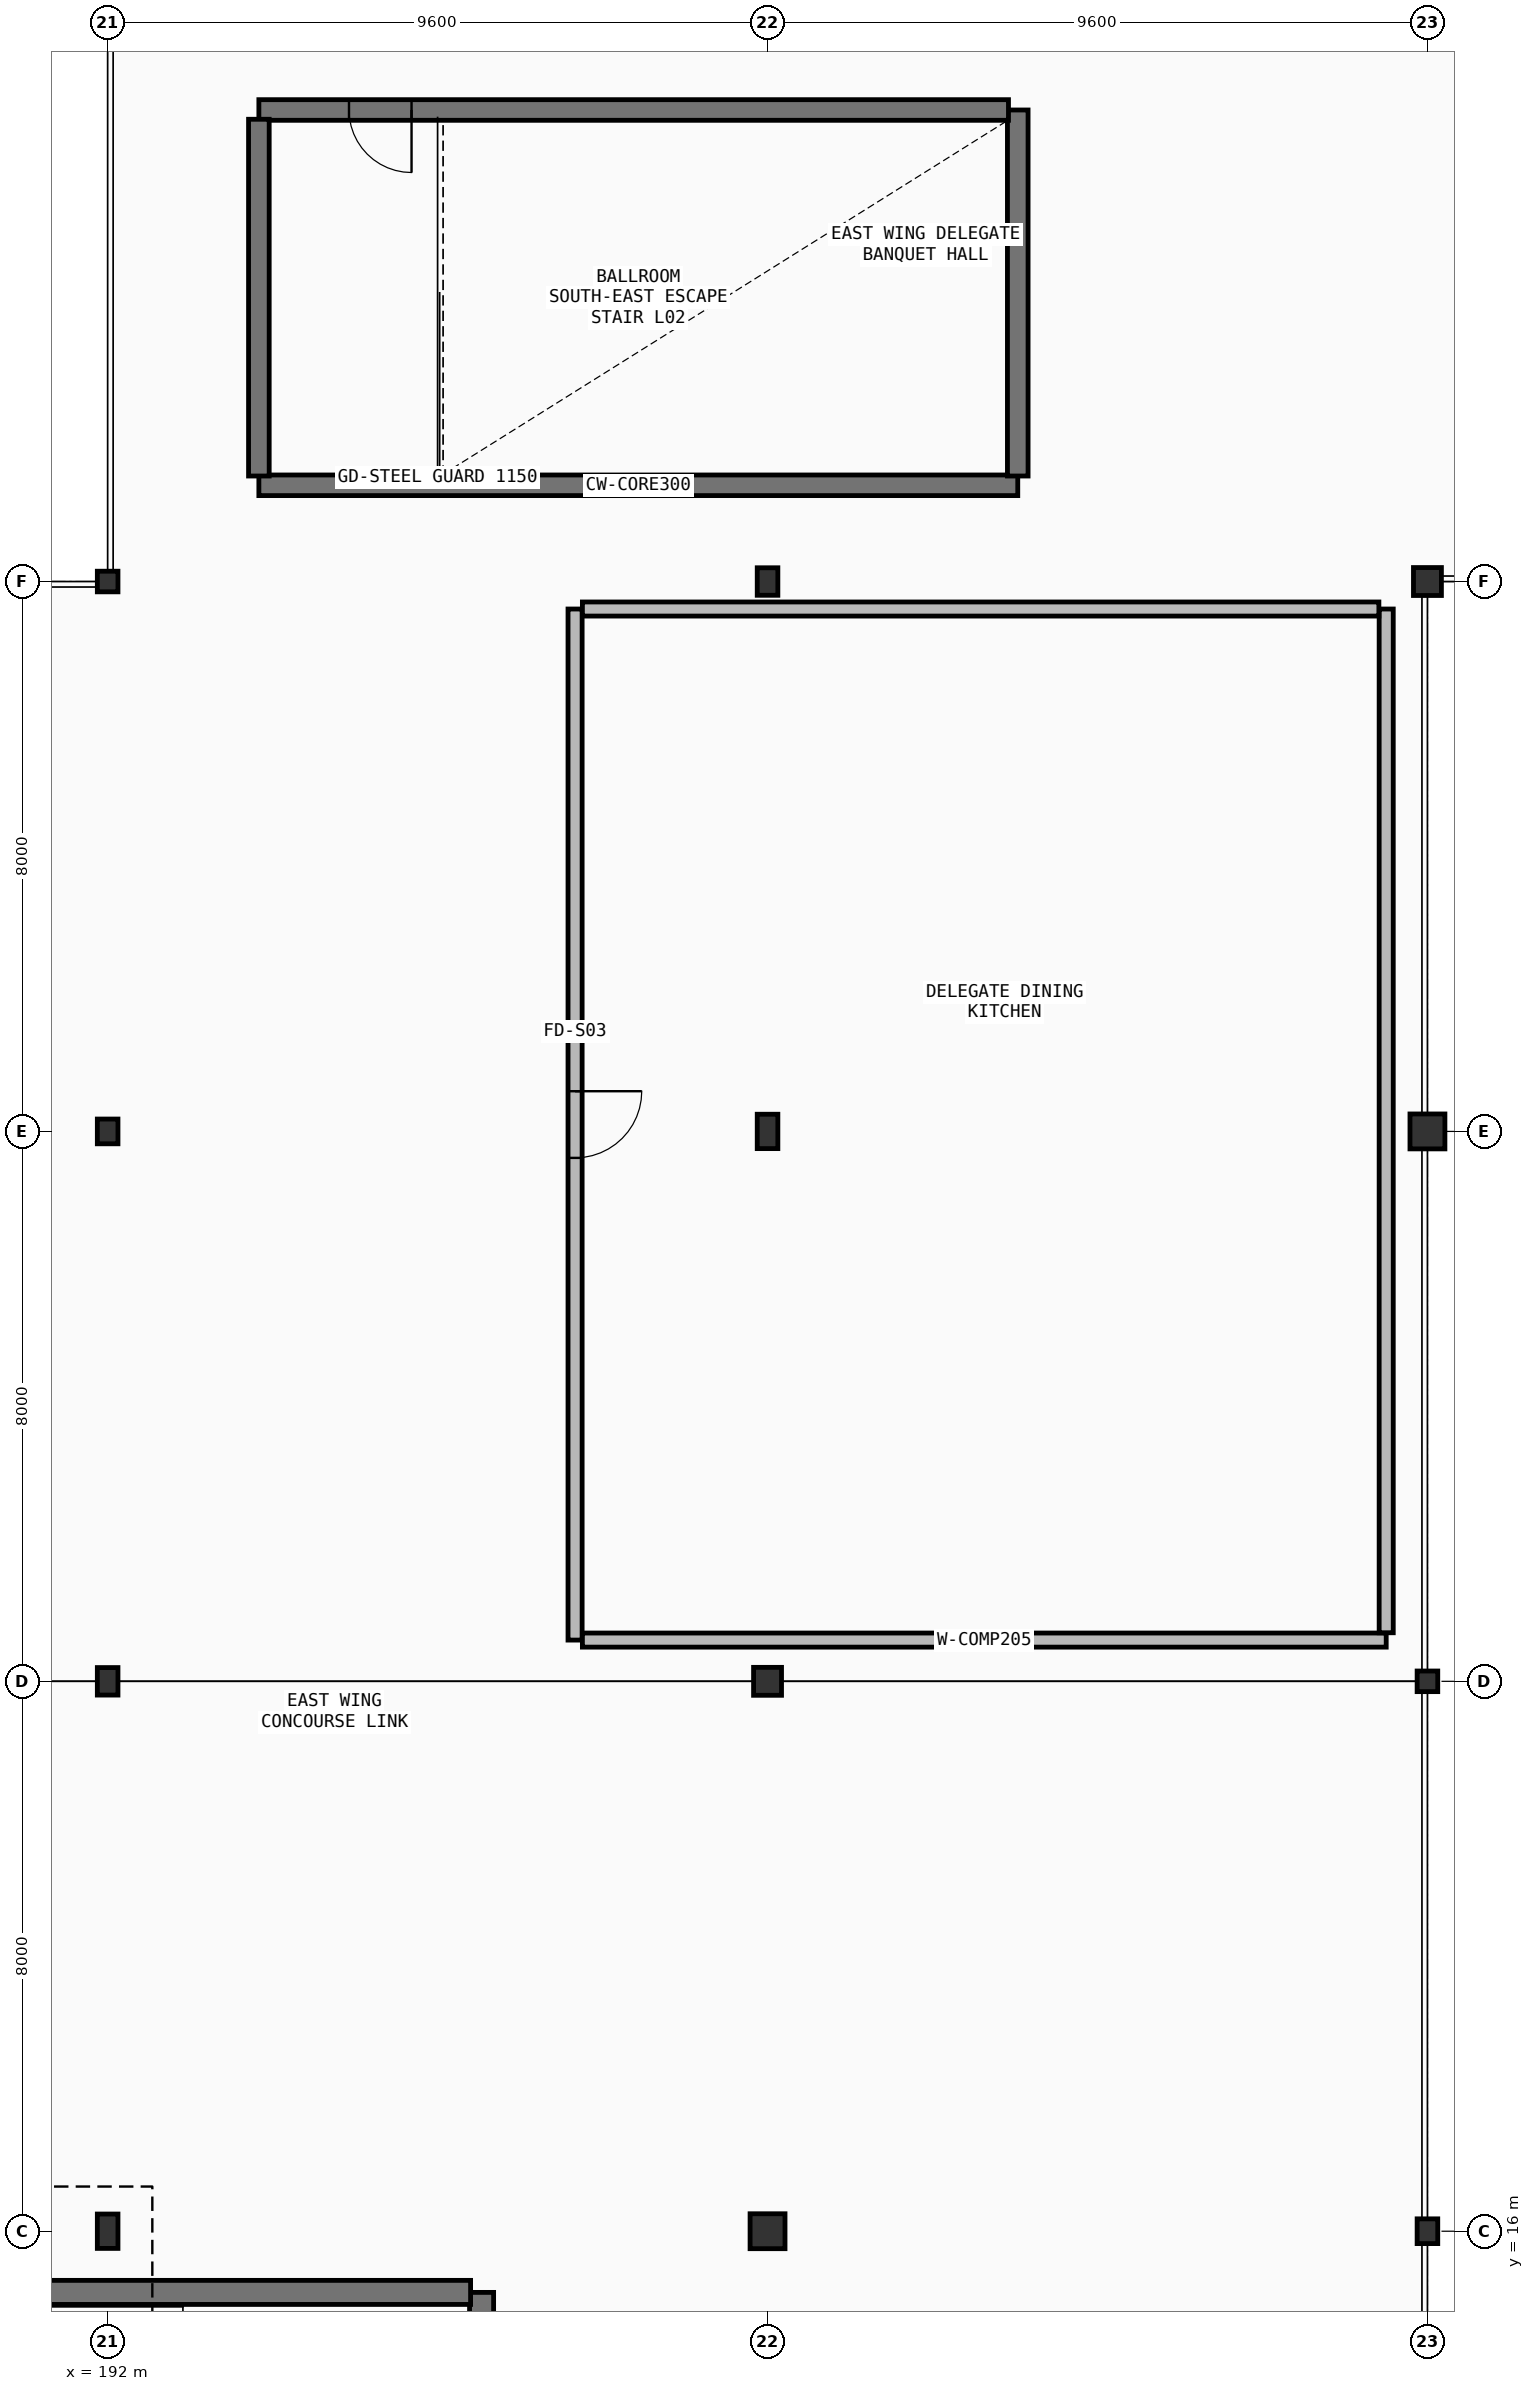
"""IFC4 building model, lengths in metres.
Left out: names, types, materials, properties, quantities, classifications, styles, units other than length and angle.
Written with IfcOpenShell. Run it as: python <this file> out.ifc"""

import sys

from ifc_helpers import new_model, si_unit, direction, frame, frame_2d, origin, origin_2d, place, context, subcontext, project, spatial, rectangle, hollow_circle, i_section, extrude, element, fill, save


model = new_model("IFC4")
c1 = context("Model", 3, precision=1e-05, world=origin(), true_north=direction((0.0, 1.0)))
c2 = subcontext(c1, "Body", "Model", "MODEL_VIEW")
j1 = project(units=[si_unit("LENGTHUNIT", "METRE"), si_unit("PLANEANGLEUNIT", "RADIAN")], contexts=[c1])
p1 = place(None, origin())
s1 = spatial("IfcSite", under=j1, at=p1, CompositionType="ELEMENT")
p2 = place(p1, origin())
s2 = spatial("IfcBuilding", under=s1, at=p2, CompositionType="ELEMENT")
p3 = place(p2, frame((0.0, 0.0, 11.4)))
s3 = spatial("IfcBuildingStorey", under=s2, at=p3, CompositionType="ELEMENT", Elevation=11.4)
p4 = place(p3, frame((192.0, 16.0, 0.0), z_axis=(0.0, 0.0, 1.0), x_axis=(1.0, 0.0, 0.0)))
e1 = element("IfcColumn", 1, at=p4, inside=s3, PredefinedType="COLUMN", context=c2, shape_type="SweptSolid", body=[
    extrude(i_section(OverallWidth=0.3, OverallDepth=0.5, WebThickness=0.014, FlangeThickness=0.028, FilletRadius=0.027, at=origin_2d()), origin(), (0.0, 0.0, 1.0), 4.5),
])
p5 = place(p3, frame((192.0, 24.0, 0.0), z_axis=(0.0, 0.0, 1.0), x_axis=(1.0, 0.0, 0.0)))
e2 = element("IfcColumn", 2, at=p5, inside=s3, PredefinedType="COLUMN", context=c2, shape_type="SweptSolid", body=[
    extrude(i_section(OverallWidth=0.3, OverallDepth=0.4, WebThickness=0.013, FlangeThickness=0.024, FilletRadius=0.027, at=origin_2d()), origin(), (0.0, 0.0, 1.0), 4.5),
])
p6 = place(p3, frame((192.0, 32.0, 0.0), z_axis=(0.0, 0.0, 1.0), x_axis=(1.0, 0.0, 0.0)))
e3 = element("IfcColumn", 3, at=p6, inside=s3, PredefinedType="COLUMN", context=c2, shape_type="SweptSolid", body=[
    extrude(i_section(OverallWidth=0.3, OverallDepth=0.36, WebThickness=0.012, FlangeThickness=0.022, FilletRadius=0.027, at=origin_2d()), origin(), (0.0, 0.0, 1.0), 4.5),
])
p7 = place(p3, frame((192.0, 40.0, 0.0), z_axis=(0.0, 0.0, 1.0), x_axis=(1.0, 0.0, 0.0)))
e4 = element("IfcColumn", 4, at=p7, inside=s3, PredefinedType="COLUMN", context=c2, shape_type="SweptSolid", body=[
    extrude(i_section(OverallWidth=0.3, OverallDepth=0.3, WebThickness=0.011, FlangeThickness=0.019, FilletRadius=0.027, at=origin_2d()), origin(), (0.0, 0.0, 1.0), 4.5),
])
p8 = place(p3, frame((201.6, 16.0, 0.0), z_axis=(0.0, 0.0, 1.0), x_axis=(1.0, 0.0, 0.0)))
e5 = element("IfcColumn", 5, at=p8, inside=s3, PredefinedType="COLUMN", context=c2, shape_type="SweptSolid", body=[
    extrude(hollow_circle(Radius=0.254, WallThickness=0.025, at=origin_2d()), origin(), (0.0, 0.0, 1.0), 4.5),
])
p9 = place(p3, frame((201.6, 24.0, 0.0), z_axis=(0.0, 0.0, 1.0), x_axis=(1.0, 0.0, 0.0)))
e6 = element("IfcColumn", 6, at=p9, inside=s3, PredefinedType="COLUMN", context=c2, shape_type="SweptSolid", body=[
    extrude(hollow_circle(Radius=0.203, WallThickness=0.02, at=origin_2d()), origin(), (0.0, 0.0, 1.0), 4.5),
])
p10 = place(p3, frame((201.6, 32.0, 0.0), z_axis=(0.0, 0.0, 1.0), x_axis=(1.0, 0.0, 0.0)))
e7 = element("IfcColumn", 7, at=p10, inside=s3, PredefinedType="COLUMN", context=c2, shape_type="SweptSolid", body=[
    extrude(i_section(OverallWidth=0.3, OverallDepth=0.5, WebThickness=0.014, FlangeThickness=0.028, FilletRadius=0.027, at=origin_2d()), origin(), (0.0, 0.0, 1.0), 4.5),
])
p11 = place(p3, frame((201.6, 40.0, 0.0), z_axis=(0.0, 0.0, 1.0), x_axis=(1.0, 0.0, 0.0)))
e8 = element("IfcColumn", 8, at=p11, inside=s3, PredefinedType="COLUMN", context=c2, shape_type="SweptSolid", body=[
    extrude(i_section(OverallWidth=0.3, OverallDepth=0.4, WebThickness=0.013, FlangeThickness=0.024, FilletRadius=0.027, at=origin_2d()), origin(), (0.0, 0.0, 1.0), 4.5),
])
p12 = place(p3, frame((211.2, 16.0, 0.0), z_axis=(0.0, 0.0, 1.0), x_axis=(1.0, 0.0, 0.0)))
e9 = element("IfcColumn", 9, at=p12, inside=s3, PredefinedType="COLUMN", context=c2, shape_type="SweptSolid", body=[
    extrude(i_section(OverallWidth=0.3, OverallDepth=0.36, WebThickness=0.012, FlangeThickness=0.022, FilletRadius=0.027, at=origin_2d()), origin(), (0.0, 0.0, 1.0), 4.5),
])
p13 = place(p3, frame((211.2, 24.0, 0.0), z_axis=(0.0, 0.0, 1.0), x_axis=(1.0, 0.0, 0.0)))
e10 = element("IfcColumn", 10, at=p13, inside=s3, PredefinedType="COLUMN", context=c2, shape_type="SweptSolid", body=[
    extrude(i_section(OverallWidth=0.3, OverallDepth=0.3, WebThickness=0.011, FlangeThickness=0.019, FilletRadius=0.027, at=origin_2d()), origin(), (0.0, 0.0, 1.0), 4.5),
])
p14 = place(p3, frame((211.2, 32.0, 0.0), z_axis=(0.0, 0.0, 1.0), x_axis=(1.0, 0.0, 0.0)))
e11 = element("IfcColumn", 11, at=p14, inside=s3, PredefinedType="COLUMN", context=c2, shape_type="SweptSolid", body=[
    extrude(hollow_circle(Radius=0.254, WallThickness=0.025, at=origin_2d()), origin(), (0.0, 0.0, 1.0), 4.5),
])
p15 = place(p3, frame((211.2, 40.0, 0.0), z_axis=(0.0, 0.0, 1.0), x_axis=(1.0, 0.0, 0.0)))
e12 = element("IfcColumn", 12, at=p15, inside=s3, PredefinedType="COLUMN", context=c2, shape_type="SweptSolid", body=[
    extrude(hollow_circle(Radius=0.203, WallThickness=0.02, at=origin_2d()), origin(), (0.0, 0.0, 1.0), 4.5),
])
p16 = place(p3, frame((197.44, 9.81, 0.0), z_axis=(0.0, 0.0, 1.0), x_axis=(0.0, 1.0, 0.0)))
e13 = element("IfcWall", 13, at=p16, inside=s3, PredefinedType="SHEAR", context=c2, shape_type="SweptSolid", body=[
    extrude(rectangle(XDim=5.3, YDim=0.35, at=frame_2d((2.65, 0.0))), origin(), (0.0, 0.0, 1.0), 4.276),
])
p17 = place(p3, frame((197.28, 15.11, 0.0), z_axis=(0.0, 0.0, 1.0), x_axis=(-1.0, 0.0, 0.0)))
e14 = element("IfcWall", 14, at=p17, inside=s3, PredefinedType="SHEAR", context=c2, shape_type="SweptSolid", body=[
    extrude(rectangle(XDim=10.88, YDim=0.35, at=frame_2d((5.44, 0.0))), origin(), (0.0, 0.0, 1.0), 4.276),
])
p18 = place(p3, frame((194.2, 41.4, 0.0), z_axis=(0.0, 0.0, 1.0), x_axis=(1.0, 0.0, 0.0)))
e15 = element("IfcWall", 15, at=p18, inside=s3, PredefinedType="SHEAR", context=c2, shape_type="SweptSolid", body=[
    extrude(rectangle(XDim=11.04, YDim=0.3, at=frame_2d((5.52, 0.0))), origin(), (0.0, 0.0, 1.0), 4.264),
])
p19 = place(p3, frame((205.24, 41.535, 0.0), z_axis=(0.0, 0.0, 1.0), x_axis=(0.0, 1.0, 0.0)))
e16 = element("IfcWall", 16, at=p19, inside=s3, PredefinedType="SHEAR", context=c2, shape_type="SweptSolid", body=[
    extrude(rectangle(XDim=5.325, YDim=0.3, at=frame_2d((2.663, 0.0))), origin(), (0.0, 0.0, 1.0), 4.264),
])
p20 = place(p3, frame((205.105, 46.86, 0.0), z_axis=(0.0, 0.0, 1.0), x_axis=(-1.0, 0.0, 0.0)))
e17 = element("IfcWall", 17, at=p20, inside=s3, PredefinedType="SHEAR", context=c2, shape_type="SweptSolid", body=[
    extrude(rectangle(XDim=10.905, YDim=0.3, at=frame_2d((5.453, 0.0))), origin(), (0.0, 0.0, 1.0), 4.264),
])
p21 = place(p20, frame((8.684, 0.0, 0.0)))
e18 = element("IfcOpeningElement", 18, at=p21, cuts=e17, PredefinedType="OPENING", context=c2, shape_type="SweptSolid", body=[
    extrude(rectangle(XDim=0.91, YDim=2.08, at=frame_2d((0.455, 1.04))), frame((0.0, 0.16, 0.0), z_axis=(0.0, -1.0, 0.0), x_axis=(1.0, 0.0, 0.0)), (0.0, 0.0, 1.0), 0.32),
])
p22 = place(p3, frame((194.2, 46.725, 0.0), z_axis=(0.0, 0.0, 1.0), x_axis=(0.0, -1.0, 0.0)))
e19 = element("IfcWall", 19, at=p22, inside=s3, PredefinedType="SHEAR", context=c2, shape_type="SweptSolid", body=[
    extrude(rectangle(XDim=5.19, YDim=0.3, at=frame_2d((2.595, 0.0))), origin(), (0.0, 0.0, 1.0), 4.264),
])
p23 = place(p3, frame((198.8, 39.6, 0.0), z_axis=(0.0, 0.0, 1.0), x_axis=(0.0, -1.0, 0.0)))
e20 = element("IfcWall", 20, at=p23, inside=s3, PredefinedType="SOLIDWALL", context=c2, shape_type="SweptSolid", body=[
    extrude(rectangle(XDim=15.0, YDim=0.205, at=frame_2d((7.5, 0.0))), origin(), (0.0, 0.0, 1.0), 3.734),
])
p24 = place(p23, frame((7.015, 0.0, 0.0)))
e21 = element("IfcOpeningElement", 21, at=p24, cuts=e20, PredefinedType="OPENING", context=c2, shape_type="SweptSolid", body=[
    extrude(rectangle(XDim=0.97, YDim=2.1, at=frame_2d((0.485, 1.05))), frame((0.0, 0.113, 0.0), z_axis=(0.0, -1.0, 0.0), x_axis=(1.0, 0.0, 0.0)), (0.0, 0.0, 1.0), 0.225),
])
p25 = place(p3, frame((198.906, 24.6, 0.0), z_axis=(0.0, 0.0, 1.0), x_axis=(1.0, 0.0, 0.0)))
e22 = element("IfcWall", 22, at=p25, inside=s3, PredefinedType="SOLIDWALL", context=c2, shape_type="SweptSolid", body=[
    extrude(rectangle(XDim=11.694, YDim=0.205, at=frame_2d((5.847, 0.0))), origin(), (0.0, 0.0, 1.0), 3.634),
])
p26 = place(p3, frame((210.6, 24.707, 0.0), z_axis=(0.0, 0.0, 1.0), x_axis=(0.0, 1.0, 0.0)))
e23 = element("IfcWall", 23, at=p26, inside=s3, PredefinedType="SOLIDWALL", context=c2, shape_type="SweptSolid", body=[
    extrude(rectangle(XDim=14.894, YDim=0.205, at=frame_2d((7.447, 0.0))), origin(), (0.0, 0.0, 1.0), 3.784),
])
p27 = place(p3, frame((210.493, 39.6, 0.0), z_axis=(0.0, 0.0, 1.0), x_axis=(-1.0, 0.0, 0.0)))
e24 = element("IfcWall", 24, at=p27, inside=s3, PredefinedType="SOLIDWALL", context=c2, shape_type="SweptSolid", body=[
    extrude(rectangle(XDim=11.587, YDim=0.205, at=frame_2d((5.793, 0.0))), origin(), (0.0, 0.0, 1.0), 3.684),
])
p28 = place(p21, origin())
e25 = element("IfcDoor", 25, at=p28, inside=s3, OperationType="SINGLE_SWING_LEFT", PredefinedType="DOOR", context=c2, shape_type="SweptSolid", body=[
    extrude(rectangle(XDim=0.91, YDim=2.08, at=frame_2d((0.455, 1.04))), frame((0.0, 0.025, 0.0), z_axis=(0.0, -1.0, 0.0), x_axis=(1.0, 0.0, 0.0)), (0.0, 0.0, 1.0), 0.05),
])
fill(e18, e25)
p29 = place(p24, origin())
e26 = element("IfcDoor", 26, at=p29, inside=s3, OperationType="SINGLE_SWING_RIGHT", PredefinedType="DOOR", context=c2, shape_type="SweptSolid", body=[
    extrude(rectangle(XDim=0.97, YDim=2.1, at=frame_2d((0.485, 1.05))), frame((0.0, 0.025, 0.0), z_axis=(0.0, -1.0, 0.0), x_axis=(1.0, 0.0, 0.0)), (0.0, 0.0, 1.0), 0.05),
])
fill(e21, e26)
save(model, sys.argv[1])
